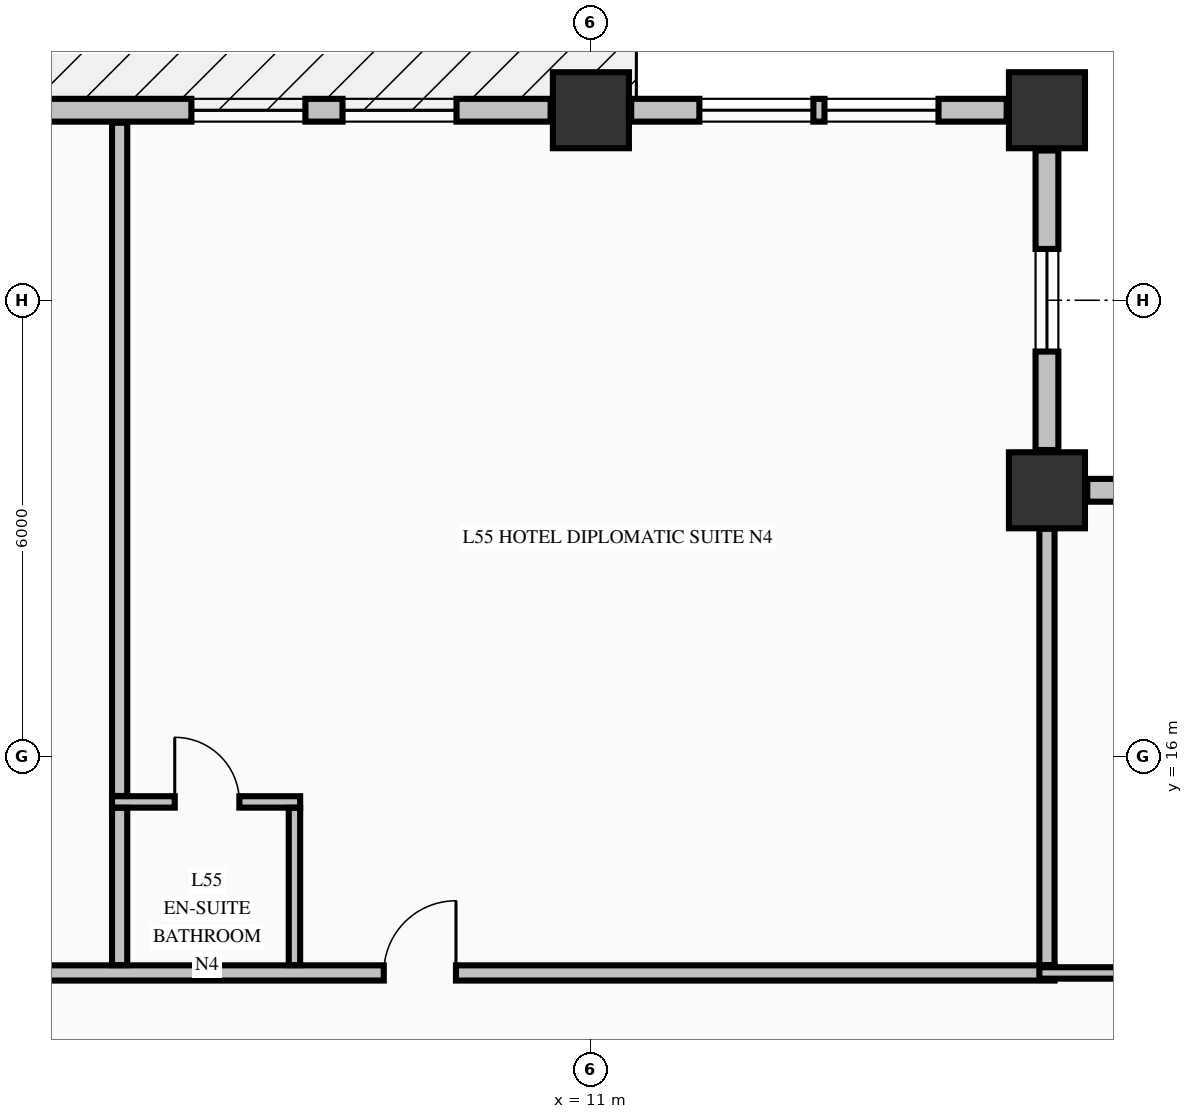
"""IFC4 building model, lengths in metres.
Left out: names, types, materials, properties, quantities, classifications, styles, units other than length and angle.
Written with IfcOpenShell. Run it as: python <this file> out.ifc"""

import sys

from ifc_helpers import new_model, si_unit, direction, frame, frame_2d, origin, origin_2d, place, context, subcontext, project, spatial, rectangle, extrude, element, fill, save


model = new_model("IFC4")
c1 = context("Model", 3, precision=1e-05, world=origin(), true_north=direction((0.0, 1.0)))
c2 = subcontext(c1, "Body", "Model", "MODEL_VIEW")
j1 = project(units=[si_unit("LENGTHUNIT", "METRE"), si_unit("PLANEANGLEUNIT", "RADIAN")], contexts=[c1])
p1 = place(None, origin())
s1 = spatial("IfcSite", under=j1, at=p1, CompositionType="ELEMENT")
p2 = place(p1, origin())
s2 = spatial("IfcBuilding", under=s1, at=p2, CompositionType="ELEMENT")
p3 = place(p2, frame((0.0, 0.0, 211.86)))
s3 = spatial("IfcBuildingStorey", under=s2, at=p3, CompositionType="ELEMENT", Elevation=211.86)
for number, where, z_axis, x_axis in (
    (1, (11.0, 24.5, -0.325), (0.0, 0.0, 1.0), (1.0, 0.0, 0.0)),
    (2, (17.0, 24.5, -0.325), (0.0, 0.0, 1.0), (1.0, 0.0, 0.0)),
    (3, (17.0, 19.5, -0.325), (0.0, 0.0, 1.0), (1.0, 0.0, 0.0)),
):
    element("IfcColumn", number, at=place(p3, frame(where, z_axis=z_axis, x_axis=x_axis)), inside=s3, PredefinedType="COLUMN", context=c2, shape_type="SweptSolid", body=[
        extrude(rectangle(XDim=1.0, YDim=1.0, at=origin_2d()), origin(), (0.0, 0.0, 1.0), 3.475),
    ])
p4 = place(p3, frame((21.47, 19.5, 0.0), z_axis=(0.0, 0.0, 1.0), x_axis=(-1.0, 0.0, 0.0)))
e4 = element("IfcWall", 4, at=p4, inside=s3, PredefinedType="STANDARD", context=c2, shape_type="SweptSolid", body=[
    extrude(rectangle(XDim=3.94, YDim=0.3, at=frame_2d((1.97, 0.0))), origin(), (0.0, 0.0, 1.0), 2.542),
])
p5 = place(p4, frame((1.295, 0.0, 0.68)))
e5 = element("IfcOpeningElement", 5, at=p5, cuts=e4, PredefinedType="OPENING", context=c2, shape_type="SweptSolid", body=[
    extrude(rectangle(XDim=1.35, YDim=1.42, at=frame_2d((0.675, 0.71))), frame((0.0, 0.16, 0.0), z_axis=(0.0, -1.0, 0.0), x_axis=(1.0, 0.0, 0.0)), (0.0, 0.0, 1.0), 0.32),
])
p6 = place(p3, frame((17.0, 20.03, 0.0), z_axis=(0.0, 0.0, 1.0), x_axis=(0.0, 1.0, 0.0)))
e6 = element("IfcWall", 6, at=p6, inside=s3, PredefinedType="STANDARD", context=c2, shape_type="SweptSolid", body=[
    extrude(rectangle(XDim=3.94, YDim=0.3, at=frame_2d((1.97, 0.0))), origin(), (0.0, 0.0, 1.0), 2.542),
])
p7 = place(p6, frame((1.295, 0.0, 0.68)))
e7 = element("IfcOpeningElement", 7, at=p7, cuts=e6, PredefinedType="OPENING", context=c2, shape_type="SweptSolid", body=[
    extrude(rectangle(XDim=1.35, YDim=1.42, at=frame_2d((0.675, 0.71))), frame((0.0, 0.16, 0.0), z_axis=(0.0, -1.0, 0.0), x_axis=(1.0, 0.0, 0.0)), (0.0, 0.0, 1.0), 0.32),
])
p8 = place(p3, frame((10.47, 24.5, 0.0), z_axis=(0.0, 0.0, 1.0), x_axis=(-1.0, 0.0, 0.0)))
e8 = element("IfcWall", 8, at=p8, inside=s3, PredefinedType="STANDARD", context=c2, shape_type="SweptSolid", body=[
    extrude(rectangle(XDim=9.94, YDim=0.3, at=frame_2d((4.97, 0.0))), origin(), (0.0, 0.0, 1.0), 2.542),
])
p9 = place(p8, frame((1.238, 0.0, 0.72)))
e9 = element("IfcOpeningElement", 9, at=p9, cuts=e8, PredefinedType="OPENING", context=c2, shape_type="SweptSolid", body=[
    extrude(rectangle(XDim=1.5, YDim=1.6, at=frame_2d((0.75, 0.8))), frame((0.0, 0.16, 0.0), z_axis=(0.0, -1.0, 0.0), x_axis=(1.0, 0.0, 0.0)), (0.0, 0.0, 1.0), 0.32),
])
p10 = place(p8, frame((3.226, 0.0, 0.72)))
e10 = element("IfcOpeningElement", 10, at=p10, cuts=e8, PredefinedType="OPENING", context=c2, shape_type="SweptSolid", body=[
    extrude(rectangle(XDim=1.5, YDim=1.6, at=frame_2d((0.75, 0.8))), frame((0.0, 0.16, 0.0), z_axis=(0.0, -1.0, 0.0), x_axis=(1.0, 0.0, 0.0)), (0.0, 0.0, 1.0), 0.32),
])
p11 = place(p8, frame((7.202, 0.0, 0.72)))
e11 = element("IfcOpeningElement", 11, at=p11, cuts=e8, PredefinedType="OPENING", context=c2, shape_type="SweptSolid", body=[
    extrude(rectangle(XDim=1.5, YDim=1.6, at=frame_2d((0.75, 0.8))), frame((0.0, 0.16, 0.0), z_axis=(0.0, -1.0, 0.0), x_axis=(1.0, 0.0, 0.0)), (0.0, 0.0, 1.0), 0.32),
])
p12 = place(p3, frame((16.47, 24.5, 0.0), z_axis=(0.0, 0.0, 1.0), x_axis=(-1.0, 0.0, 0.0)))
e12 = element("IfcWall", 12, at=p12, inside=s3, PredefinedType="STANDARD", context=c2, shape_type="SweptSolid", body=[
    extrude(rectangle(XDim=4.94, YDim=0.3, at=frame_2d((2.47, 0.0))), origin(), (0.0, 0.0, 1.0), 2.542),
])
p13 = place(p12, frame((0.897, 0.0, 0.72)))
e13 = element("IfcOpeningElement", 13, at=p13, cuts=e12, PredefinedType="OPENING", context=c2, shape_type="SweptSolid", body=[
    extrude(rectangle(XDim=1.5, YDim=1.6, at=frame_2d((0.75, 0.8))), frame((0.0, 0.16, 0.0), z_axis=(0.0, -1.0, 0.0), x_axis=(1.0, 0.0, 0.0)), (0.0, 0.0, 1.0), 0.32),
])
p14 = place(p12, frame((2.543, 0.0, 0.72)))
e14 = element("IfcOpeningElement", 14, at=p14, cuts=e12, PredefinedType="OPENING", context=c2, shape_type="SweptSolid", body=[
    extrude(rectangle(XDim=1.5, YDim=1.6, at=frame_2d((0.75, 0.8))), frame((0.0, 0.16, 0.0), z_axis=(0.0, -1.0, 0.0), x_axis=(1.0, 0.0, 0.0)), (0.0, 0.0, 1.0), 0.32),
])
p15 = place(p3, frame((-22.1, 13.15, 0.0), z_axis=(0.0, 0.0, 1.0), x_axis=(1.0, 0.0, 0.0)))
e15 = element("IfcWall", 15, at=p15, inside=s3, PredefinedType="PARTITIONING", context=c2, shape_type="SweptSolid", body=[
    extrude(rectangle(XDim=39.2, YDim=0.2, at=frame_2d((19.6, 0.0))), origin(), (0.0, 0.0, 1.0), 3.15),
])
p16 = place(p15, frame((5.125, 0.0, 0.0)))
e16 = element("IfcOpeningElement", 16, at=p16, cuts=e15, PredefinedType="OPENING", context=c2, shape_type="SweptSolid", body=[
    extrude(rectangle(XDim=1.05, YDim=2.15, at=frame_2d((0.525, 1.075))), frame((0.0, 0.11, 0.0), z_axis=(0.0, -1.0, 0.0), x_axis=(1.0, 0.0, 0.0)), (0.0, 0.0, 1.0), 0.22),
])
p17 = place(p15, frame((14.125, 0.0, 0.0)))
e17 = element("IfcOpeningElement", 17, at=p17, cuts=e15, PredefinedType="OPENING", context=c2, shape_type="SweptSolid", body=[
    extrude(rectangle(XDim=0.95, YDim=2.15, at=frame_2d((0.475, 1.075))), frame((0.0, 0.11, 0.0), z_axis=(0.0, -1.0, 0.0), x_axis=(1.0, 0.0, 0.0)), (0.0, 0.0, 1.0), 0.22),
])
p18 = place(p15, frame((21.375, 0.0, 0.0)))
e18 = element("IfcOpeningElement", 18, at=p18, cuts=e15, PredefinedType="OPENING", context=c2, shape_type="SweptSolid", body=[
    extrude(rectangle(XDim=0.95, YDim=2.15, at=frame_2d((0.475, 1.075))), frame((0.0, 0.11, 0.0), z_axis=(0.0, -1.0, 0.0), x_axis=(1.0, 0.0, 0.0)), (0.0, 0.0, 1.0), 0.22),
])
p19 = place(p15, frame((30.375, 0.0, 0.0)))
e19 = element("IfcOpeningElement", 19, at=p19, cuts=e15, PredefinedType="OPENING", context=c2, shape_type="SweptSolid", body=[
    extrude(rectangle(XDim=0.95, YDim=2.15, at=frame_2d((0.475, 1.075))), frame((0.0, 0.11, 0.0), z_axis=(0.0, -1.0, 0.0), x_axis=(1.0, 0.0, 0.0)), (0.0, 0.0, 1.0), 0.22),
])
p20 = place(p3, frame((16.9, 13.15, 0.0), z_axis=(0.0, 0.0, 1.0), x_axis=(1.0, 0.0, 0.0)))
e20 = element("IfcWall", 20, at=p20, inside=s3, PredefinedType="PARTITIONING", context=c2, shape_type="SweptSolid", body=[
    extrude(rectangle(XDim=3.175, YDim=0.15, at=frame_2d((1.587, 0.0))), origin(), (0.0, 0.0, 1.0), 3.15),
])
p21 = place(p3, frame((4.7, 15.4, 0.0), z_axis=(0.0, 0.0, 1.0), x_axis=(1.0, 0.0, 0.0)))
e21 = element("IfcWall", 21, at=p21, inside=s3, PredefinedType="PARTITIONING", context=c2, shape_type="SweptSolid", body=[
    extrude(rectangle(XDim=2.475, YDim=0.15, at=frame_2d((1.238, 0.0))), origin(), (0.0, 0.0, 1.0), 3.15),
])
p22 = place(p21, frame((0.825, 0.0, 0.0)))
e22 = element("IfcOpeningElement", 22, at=p22, cuts=e21, PredefinedType="OPENING", context=c2, shape_type="SweptSolid", body=[
    extrude(rectangle(XDim=0.85, YDim=2.1, at=frame_2d((0.425, 1.05))), frame((0.0, 0.085, 0.0), z_axis=(0.0, -1.0, 0.0), x_axis=(1.0, 0.0, 0.0)), (0.0, 0.0, 1.0), 0.17),
])
p23 = place(p3, frame((4.8, 13.253, 0.0), z_axis=(0.0, 0.0, 1.0), x_axis=(0.0, 1.0, 0.0)))
e23 = element("IfcWall", 23, at=p23, inside=s3, PredefinedType="PARTITIONING", context=c2, shape_type="SweptSolid", body=[
    extrude(rectangle(XDim=2.069, YDim=0.2, at=frame_2d((1.035, 0.0))), origin(), (0.0, 0.0, 1.0), 3.15),
])
p24 = place(p3, frame((4.8, 15.478, 0.0), z_axis=(0.0, 0.0, 1.0), x_axis=(0.0, 1.0, 0.0)))
e24 = element("IfcWall", 24, at=p24, inside=s3, PredefinedType="PARTITIONING", context=c2, shape_type="SweptSolid", body=[
    extrude(rectangle(XDim=8.857, YDim=0.2, at=frame_2d((4.428, 0.0))), origin(), (0.0, 0.0, 1.0), 3.15),
])
p25 = place(p3, frame((7.1, 13.253, 0.0), z_axis=(0.0, 0.0, 1.0), x_axis=(0.0, 1.0, 0.0)))
e25 = element("IfcWall", 25, at=p25, inside=s3, PredefinedType="PARTITIONING", context=c2, shape_type="SweptSolid", body=[
    extrude(rectangle(XDim=2.069, YDim=0.15, at=frame_2d((1.035, 0.0))), origin(), (0.0, 0.0, 1.0), 3.15),
])
p26 = place(p3, frame((17.0, 13.253, 0.0), z_axis=(0.0, 0.0, 1.0), x_axis=(0.0, 1.0, 0.0)))
e26 = element("IfcWall", 26, at=p26, inside=s3, PredefinedType="PARTITIONING", context=c2, shape_type="SweptSolid", body=[
    extrude(rectangle(XDim=5.741, YDim=0.2, at=frame_2d((2.871, 0.0))), origin(), (0.0, 0.0, 1.0), 3.15),
])
p27 = place(p7, origin())
e27 = element("IfcWindow", 27, at=p27, inside=s3, PartitioningType="SINGLE_PANEL", PredefinedType="WINDOW", context=c2, shape_type="SweptSolid", body=[
    extrude(rectangle(XDim=1.35, YDim=1.42, at=frame_2d((0.675, 0.71))), frame((0.0, 0.03, 0.0), z_axis=(0.0, -1.0, 0.0), x_axis=(1.0, 0.0, 0.0)), (0.0, 0.0, 1.0), 0.06),
])
fill(e7, e27)
p28 = place(p9, origin())
e28 = element("IfcWindow", 28, at=p28, inside=s3, PartitioningType="SINGLE_PANEL", PredefinedType="WINDOW", context=c2, shape_type="SweptSolid", body=[
    extrude(rectangle(XDim=1.5, YDim=1.6, at=frame_2d((0.75, 0.8))), frame((0.0, 0.03, 0.0), z_axis=(0.0, -1.0, 0.0), x_axis=(1.0, 0.0, 0.0)), (0.0, 0.0, 1.0), 0.06),
])
fill(e9, e28)
p29 = place(p10, origin())
e29 = element("IfcWindow", 29, at=p29, inside=s3, PartitioningType="SINGLE_PANEL", PredefinedType="WINDOW", context=c2, shape_type="SweptSolid", body=[
    extrude(rectangle(XDim=1.5, YDim=1.6, at=frame_2d((0.75, 0.8))), frame((0.0, 0.03, 0.0), z_axis=(0.0, -1.0, 0.0), x_axis=(1.0, 0.0, 0.0)), (0.0, 0.0, 1.0), 0.06),
])
fill(e10, e29)
p30 = place(p13, origin())
e30 = element("IfcWindow", 30, at=p30, inside=s3, PartitioningType="SINGLE_PANEL", PredefinedType="WINDOW", context=c2, shape_type="SweptSolid", body=[
    extrude(rectangle(XDim=1.5, YDim=1.6, at=frame_2d((0.75, 0.8))), frame((0.0, 0.03, 0.0), z_axis=(0.0, -1.0, 0.0), x_axis=(1.0, 0.0, 0.0)), (0.0, 0.0, 1.0), 0.06),
])
fill(e13, e30)
p31 = place(p14, origin())
e31 = element("IfcWindow", 31, at=p31, inside=s3, PartitioningType="SINGLE_PANEL", PredefinedType="WINDOW", context=c2, shape_type="SweptSolid", body=[
    extrude(rectangle(XDim=1.5, YDim=1.6, at=frame_2d((0.75, 0.8))), frame((0.0, 0.03, 0.0), z_axis=(0.0, -1.0, 0.0), x_axis=(1.0, 0.0, 0.0)), (0.0, 0.0, 1.0), 0.06),
])
fill(e14, e31)
p32 = place(p19, origin())
e32 = element("IfcDoor", 32, at=p32, inside=s3, OperationType="SINGLE_SWING_RIGHT", PredefinedType="DOOR", context=c2, shape_type="SweptSolid", body=[
    extrude(rectangle(XDim=0.95, YDim=2.15, at=frame_2d((0.475, 1.075))), frame((0.0, 0.025, 0.0), z_axis=(0.0, -1.0, 0.0), x_axis=(1.0, 0.0, 0.0)), (0.0, 0.0, 1.0), 0.05),
])
fill(e19, e32)
p33 = place(p22, origin())
e33 = element("IfcDoor", 33, at=p33, inside=s3, OperationType="SINGLE_SWING_LEFT", PredefinedType="DOOR", context=c2, shape_type="SweptSolid", body=[
    extrude(rectangle(XDim=0.85, YDim=2.1, at=frame_2d((0.425, 1.05))), frame((0.0, 0.025, 0.0), z_axis=(0.0, -1.0, 0.0), x_axis=(1.0, 0.0, 0.0)), (0.0, 0.0, 1.0), 0.05),
])
fill(e22, e33)
save(model, sys.argv[1])
